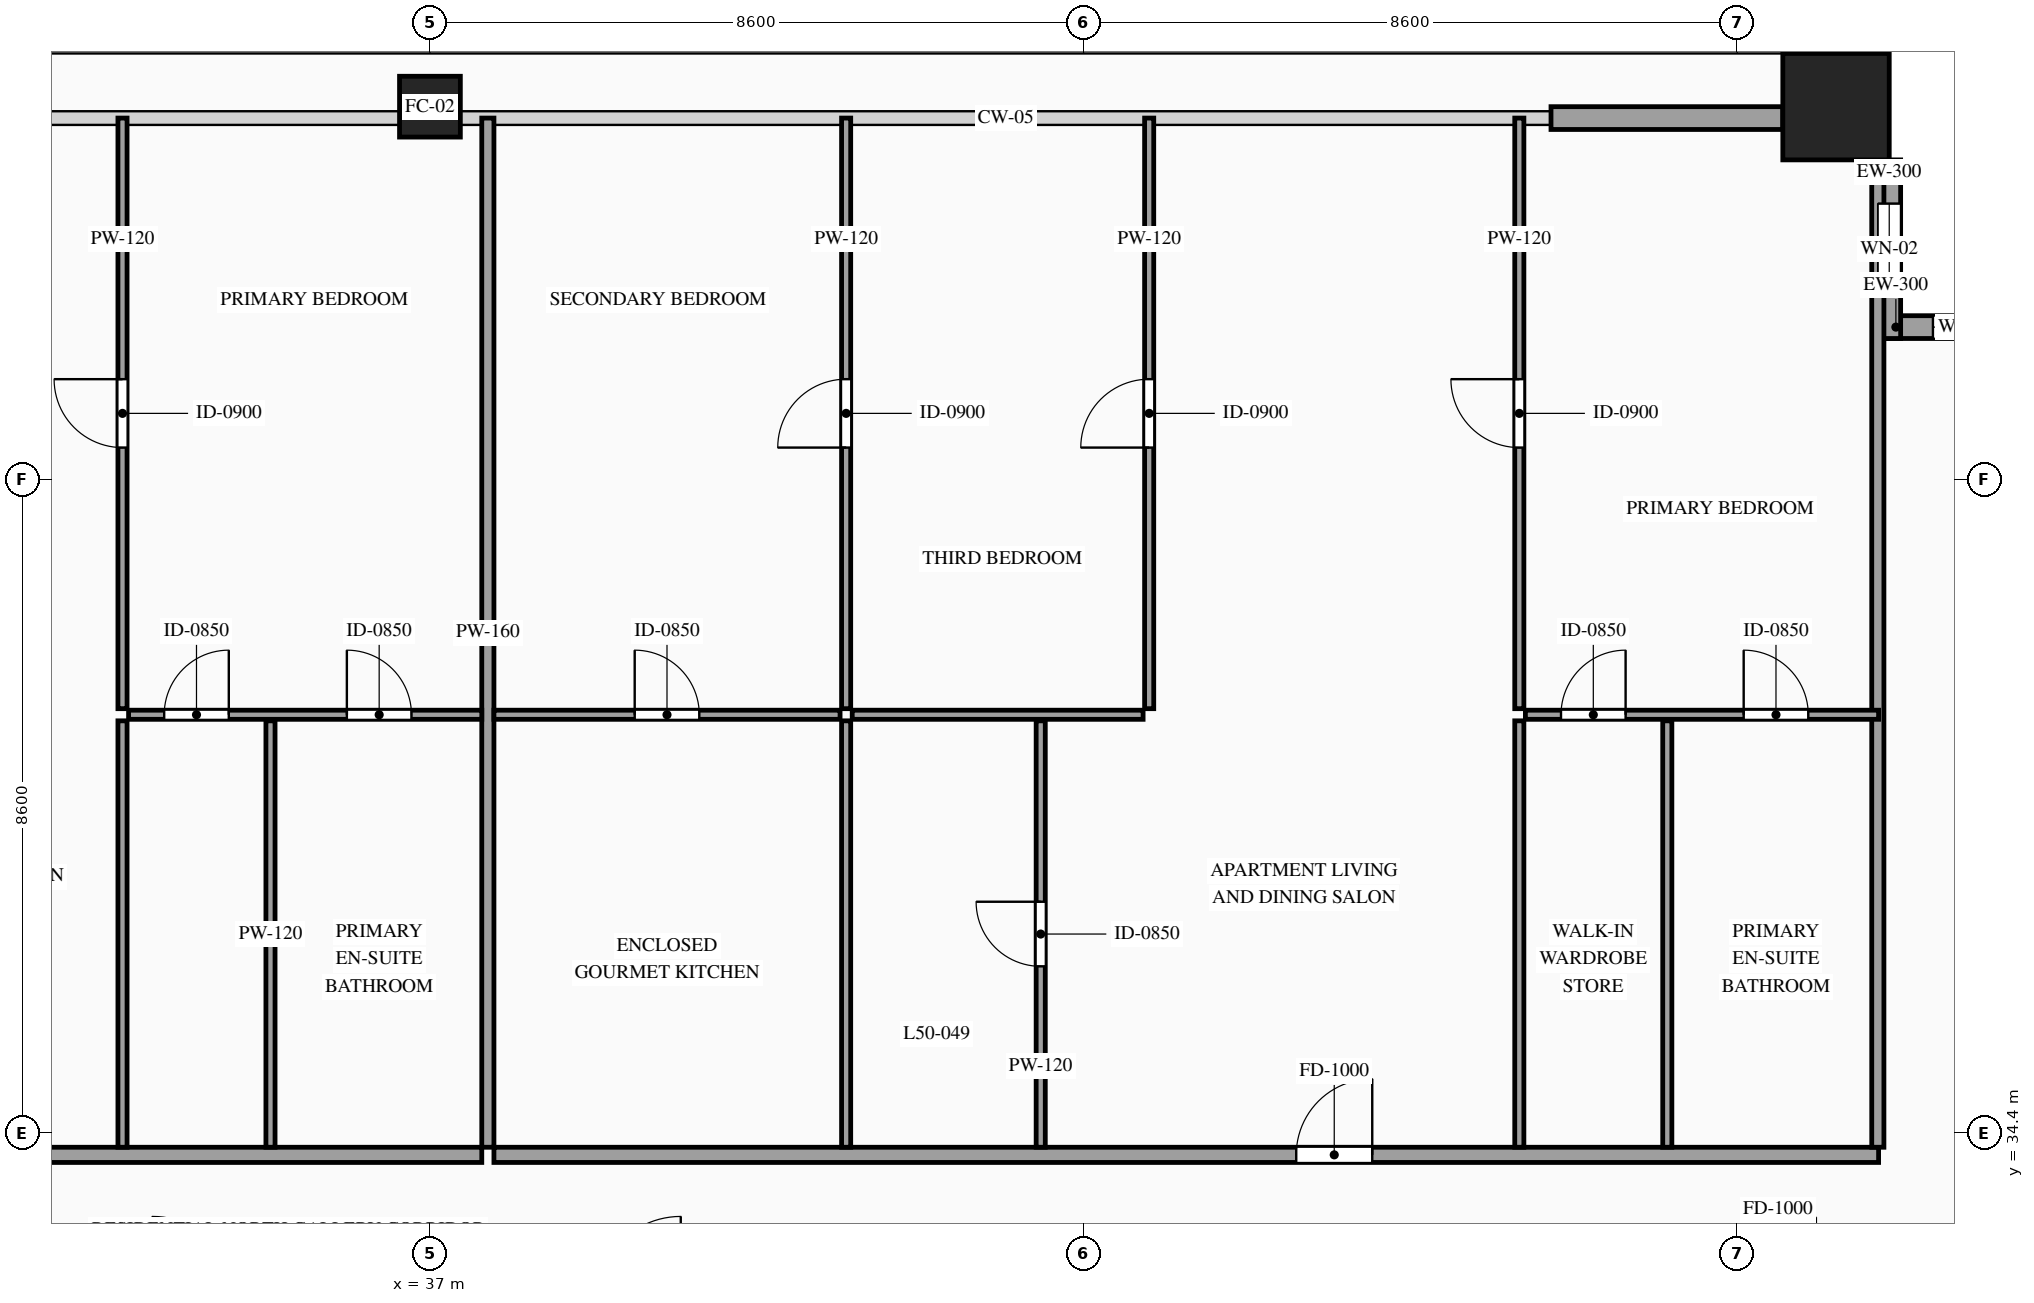
"""IFC4 building model, lengths in metres.
Left out: names, types, materials, properties, quantities, classifications, styles, units other than length and angle.
Written with IfcOpenShell. Run it as: python <this file> out.ifc"""

import sys

from ifc_helpers import new_model, si_unit, direction, frame, frame_2d, origin, origin_2d, place, context, subcontext, project, spatial, rectangle, hollow_rectangle, extrude, source, transform, mapped, element, fill, save


model = new_model("IFC4")
c1 = context("Model", 3, precision=1e-05, world=origin(), true_north=direction((0.0, 1.0)))
c2 = subcontext(c1, "Body", "Model", "MODEL_VIEW")
j1 = project(units=[si_unit("LENGTHUNIT", "METRE"), si_unit("PLANEANGLEUNIT", "RADIAN")], contexts=[c1])
p1 = place(None, origin())
s1 = spatial("IfcSite", under=j1, at=p1, CompositionType="ELEMENT")
p2 = place(p1, origin())
s2 = spatial("IfcBuilding", under=s1, at=p2, CompositionType="ELEMENT")
p3 = place(p2, frame((0.0, 0.0, 191.5)))
s3 = spatial("IfcBuildingStorey", under=s2, at=p3, CompositionType="ELEMENT", Elevation=191.5)
m1 = source(origin(), c2, "Body", "SweptSolid", [
    extrude(hollow_rectangle(XDim=0.8, YDim=0.8, WallThickness=0.036, at=origin_2d()), origin(), (0.0, 0.0, 1.0), 3.5),
])
p4 = place(p3, frame((37.0, 47.9, 0.0), z_axis=(0.0, 0.0, 1.0), x_axis=(1.0, 0.0, 0.0)))
e1 = element("IfcColumn", 1, at=p4, inside=s3, PredefinedType="COLUMN", context=c2, shape_type="MappedRepresentation", body=[
    mapped(m1, transform((0.0, 0.0, 0.0), scale=1.0)),
])
m2 = source(origin(), c2, "Body", "SweptSolid", [
    extrude(hollow_rectangle(XDim=1.4, YDim=1.4, WallThickness=0.06, at=origin_2d()), origin(), (0.0, 0.0, 1.0), 3.5),
])
p5 = place(p3, frame((55.5, 47.9, 0.0), z_axis=(0.0, 0.0, 1.0), x_axis=(1.0, 0.0, 0.0)))
e2 = element("IfcColumn", 2, at=p5, inside=s3, PredefinedType="COLUMN", context=c2, shape_type="MappedRepresentation", body=[
    mapped(m2, transform((0.0, 0.0, 0.0), scale=1.0)),
])
p6 = place(p3, frame((58.4, 45.0, 0.0), z_axis=(0.0, 0.0, 1.0), x_axis=(-1.0, 0.0, 0.0)))
e3 = element("IfcWall", 3, at=p6, inside=s3, PredefinedType="SOLIDWALL", context=c2, shape_type="SweptSolid", body=[
    extrude(rectangle(XDim=2.35, YDim=0.3, at=frame_2d((1.175, 0.0))), origin(), (0.0, 0.0, 1.0), 3.28),
])
p7 = place(p6, frame((0.725, 0.0, 0.85)))
e4 = element("IfcOpeningElement", 4, at=p7, cuts=e3, PredefinedType="OPENING", context=c2, shape_type="SweptSolid", body=[
    extrude(rectangle(XDim=0.9, YDim=1.5, at=frame_2d((0.45, 0.75))), frame((0.0, 0.165, 0.0), z_axis=(0.0, -1.0, 0.0), x_axis=(1.0, 0.0, 0.0)), (0.0, 0.0, 1.0), 0.33),
])
p8 = place(p3, frame((56.2, 44.85, 0.0), z_axis=(0.0, 0.0, 1.0), x_axis=(0.0, 1.0, 0.0)))
e5 = element("IfcWall", 5, at=p8, inside=s3, PredefinedType="SOLIDWALL", context=c2, shape_type="SweptSolid", body=[
    extrude(rectangle(XDim=2.35, YDim=0.3, at=frame_2d((1.175, 0.0))), origin(), (0.0, 0.0, 1.0), 3.28),
])
p9 = place(p8, frame((0.575, 0.0, 0.85)))
e6 = element("IfcOpeningElement", 6, at=p9, cuts=e5, PredefinedType="OPENING", context=c2, shape_type="SweptSolid", body=[
    extrude(rectangle(XDim=1.2, YDim=2.1, at=frame_2d((0.6, 1.05))), frame((0.0, 0.165, 0.0), z_axis=(0.0, -1.0, 0.0), x_axis=(1.0, 0.0, 0.0)), (0.0, 0.0, 1.0), 0.33),
])
m3 = source(origin(), c2, "Body", "SweptSolid", [
    extrude(rectangle(XDim=3.05, YDim=0.3, at=frame_2d((1.525, 0.0))), origin(), (0.0, 0.0, 1.0), 2.835),
])
p10 = place(p3, frame((51.75, 47.75, 0.0), z_axis=(0.0, 0.0, 1.0), x_axis=(1.0, 0.0, 0.0)))
e7 = element("IfcWall", 7, at=p10, inside=s3, PredefinedType="SOLIDWALL", context=c2, shape_type="MappedRepresentation", body=[
    mapped(m3, transform((0.0, 0.0, 0.0), scale=1.0)),
])
p11 = place(p3, frame((17.94, 34.11, 0.0), z_axis=(0.0, 0.0, 1.0), x_axis=(1.0, 0.0, 0.0)))
e8 = element("IfcWall", 8, at=p11, inside=s3, PredefinedType="PARTITIONING", context=c2, shape_type="SweptSolid", body=[
    extrude(rectangle(XDim=19.742, YDim=0.2, at=frame_2d((9.871, 0.0))), origin(), (0.0, 0.0, 1.0), 3.28),
])
p12 = place(p11, frame((11.915, 0.0, 0.0)))
e9 = element("IfcOpeningElement", 9, at=p12, cuts=e8, PredefinedType="OPENING", context=c2, shape_type="SweptSolid", body=[
    extrude(rectangle(XDim=1.0, YDim=2.2, at=frame_2d((0.5, 1.1))), frame((0.0, 0.115, 0.0), z_axis=(0.0, -1.0, 0.0), x_axis=(1.0, 0.0, 0.0)), (0.0, 0.0, 1.0), 0.23),
])
m4 = source(origin(), c2, "Body", "SweptSolid", [
    extrude(rectangle(XDim=13.54, YDim=0.16, at=frame_2d((6.77, 0.0))), origin(), (0.0, 0.0, 1.0), 3.28),
])
p13 = place(p3, frame((37.762, 34.21, 0.0), z_axis=(0.0, 0.0, 1.0), x_axis=(0.0, 1.0, 0.0)))
e10 = element("IfcWall", 10, at=p13, inside=s3, PredefinedType="PARTITIONING", context=c2, shape_type="MappedRepresentation", body=[
    mapped(m4, transform((0.0, 0.0, 0.0), scale=1.0)),
])
m5 = source(origin(), c2, "Body", "SweptSolid", [
    extrude(rectangle(XDim=5.61, YDim=0.12, at=frame_2d((2.805, 0.0))), origin(), (0.0, 0.0, 1.0), 3.28),
])
for number, where, z_axis, x_axis in (
    (11, (34.902, 34.21, 0.0), (0.0, 0.0, 1.0), (0.0, 1.0, 0.0)),
    (12, (32.955, 34.21, 0.0), (0.0, 0.0, 1.0), (0.0, 1.0, 0.0)),
):
    element("IfcWall", number, at=place(p3, frame(where, z_axis=z_axis, x_axis=x_axis)), inside=s3, PredefinedType="PARTITIONING", context=c2, shape_type="MappedRepresentation", body=[
        mapped(m5, transform((0.0, 0.0, 0.0), scale=1.0)),
    ])
p14 = place(p3, frame((33.035, 39.9, 0.0), z_axis=(0.0, 0.0, 1.0), x_axis=(1.0, 0.0, 0.0)))
e13 = element("IfcWall", 13, at=p14, inside=s3, PredefinedType="PARTITIONING", context=c2, shape_type="SweptSolid", body=[
    extrude(rectangle(XDim=4.647, YDim=0.12, at=frame_2d((2.323, 0.0))), origin(), (0.0, 0.0, 1.0), 2.875),
])
p15 = place(p14, frame((2.872, 0.0, 0.0)))
e14 = element("IfcOpeningElement", 14, at=p15, cuts=e13, PredefinedType="OPENING", context=c2, shape_type="SweptSolid", body=[
    extrude(rectangle(XDim=0.85, YDim=2.1, at=frame_2d((0.425, 1.05))), frame((0.0, 0.075, 0.0), z_axis=(0.0, -1.0, 0.0), x_axis=(1.0, 0.0, 0.0)), (0.0, 0.0, 1.0), 0.15),
])
p16 = place(p14, frame((0.469, 0.0, 0.0)))
e15 = element("IfcOpeningElement", 15, at=p16, cuts=e13, PredefinedType="OPENING", context=c2, shape_type="SweptSolid", body=[
    extrude(rectangle(XDim=0.85, YDim=2.1, at=frame_2d((0.425, 1.05))), frame((0.0, 0.075, 0.0), z_axis=(0.0, -1.0, 0.0), x_axis=(1.0, 0.0, 0.0)), (0.0, 0.0, 1.0), 0.15),
])
p17 = place(p3, frame((32.955, 39.98, 0.0), z_axis=(0.0, 0.0, 1.0), x_axis=(0.0, 1.0, 0.0)))
e16 = element("IfcWall", 16, at=p17, inside=s3, PredefinedType="PARTITIONING", context=c2, shape_type="SweptSolid", body=[
    extrude(rectangle(XDim=7.77, YDim=0.12, at=frame_2d((3.885, 0.0))), origin(), (0.0, 0.0, 1.0), 3.28),
])
p18 = place(p17, frame((3.435, 0.0, 0.0)))
e17 = element("IfcOpeningElement", 17, at=p18, cuts=e16, PredefinedType="OPENING", context=c2, shape_type="SweptSolid", body=[
    extrude(rectangle(XDim=0.9, YDim=2.15, at=frame_2d((0.45, 1.075))), frame((0.0, 0.075, 0.0), z_axis=(0.0, -1.0, 0.0), x_axis=(1.0, 0.0, 0.0)), (0.0, 0.0, 1.0), 0.15),
])
p19 = place(p3, frame((37.842, 34.11, 0.0), z_axis=(0.0, 0.0, 1.0), x_axis=(1.0, 0.0, 0.0)))
e18 = element("IfcWall", 18, at=p19, inside=s3, PredefinedType="PARTITIONING", context=c2, shape_type="SweptSolid", body=[
    extrude(rectangle(XDim=18.218, YDim=0.2, at=frame_2d((9.109, 0.0))), origin(), (0.0, 0.0, 1.0), 3.28),
])
p20 = place(p19, frame((10.556, 0.0, 0.0)))
e19 = element("IfcOpeningElement", 19, at=p20, cuts=e18, PredefinedType="OPENING", context=c2, shape_type="SweptSolid", body=[
    extrude(rectangle(XDim=1.0, YDim=2.2, at=frame_2d((0.5, 1.1))), frame((0.0, 0.115, 0.0), z_axis=(0.0, -1.0, 0.0), x_axis=(1.0, 0.0, 0.0)), (0.0, 0.0, 1.0), 0.23),
])
m6 = source(origin(), c2, "Body", "SweptSolid", [
    extrude(rectangle(XDim=13.39, YDim=0.16, at=frame_2d((6.695, 0.0))), origin(), (0.0, 0.0, 1.0), 3.28),
])
p21 = place(p3, frame((56.05, 34.21, 0.0), z_axis=(0.0, 0.0, 1.0), x_axis=(0.0, 1.0, 0.0)))
e20 = element("IfcWall", 20, at=p21, inside=s3, PredefinedType="PARTITIONING", context=c2, shape_type="MappedRepresentation", body=[
    mapped(m6, transform((0.0, 0.0, 0.0), scale=1.0)),
])
p22 = place(p3, frame((37.842, 39.9, 0.0), z_axis=(0.0, 0.0, 1.0), x_axis=(1.0, 0.0, 0.0)))
e21 = element("IfcWall", 21, at=p22, inside=s3, PredefinedType="PARTITIONING", context=c2, shape_type="SweptSolid", body=[
    extrude(rectangle(XDim=4.554, YDim=0.12, at=frame_2d((2.277, 0.0))), origin(), (0.0, 0.0, 1.0), 2.875),
])
p23 = place(p22, frame((1.852, 0.0, 0.0)))
e22 = element("IfcOpeningElement", 22, at=p23, cuts=e21, PredefinedType="OPENING", context=c2, shape_type="SweptSolid", body=[
    extrude(rectangle(XDim=0.85, YDim=2.1, at=frame_2d((0.425, 1.05))), frame((0.0, 0.075, 0.0), z_axis=(0.0, -1.0, 0.0), x_axis=(1.0, 0.0, 0.0)), (0.0, 0.0, 1.0), 0.15),
])
p24 = place(p3, frame((42.476, 34.21, 0.0), z_axis=(0.0, 0.0, 1.0), x_axis=(0.0, 1.0, 0.0)))
e23 = element("IfcWall", 23, at=p24, inside=s3, PredefinedType="PARTITIONING", context=c2, shape_type="MappedRepresentation", body=[
    mapped(m5, transform((0.0, 0.0, 0.0), scale=1.0)),
])
p25 = place(p3, frame((45.036, 34.21, 0.0), z_axis=(0.0, 0.0, 1.0), x_axis=(0.0, 1.0, 0.0)))
e24 = element("IfcWall", 24, at=p25, inside=s3, PredefinedType="PARTITIONING", context=c2, shape_type="SweptSolid", body=[
    extrude(rectangle(XDim=5.61, YDim=0.12, at=frame_2d((2.805, 0.0))), origin(), (0.0, 0.0, 1.0), 3.28),
])
p26 = place(p25, frame((2.38, 0.0, 0.0)))
e25 = element("IfcOpeningElement", 25, at=p26, cuts=e24, PredefinedType="OPENING", context=c2, shape_type="SweptSolid", body=[
    extrude(rectangle(XDim=0.85, YDim=2.1, at=frame_2d((0.425, 1.05))), frame((0.0, 0.075, 0.0), z_axis=(0.0, -1.0, 0.0), x_axis=(1.0, 0.0, 0.0)), (0.0, 0.0, 1.0), 0.15),
])
for number, where, z_axis, x_axis in (
    (26, (53.28, 34.21, 0.0), (0.0, 0.0, 1.0), (0.0, 1.0, 0.0)),
    (27, (51.333, 34.21, 0.0), (0.0, 0.0, 1.0), (0.0, 1.0, 0.0)),
):
    element("IfcWall", number, at=place(p3, frame(where, z_axis=z_axis, x_axis=x_axis)), inside=s3, PredefinedType="PARTITIONING", context=c2, shape_type="MappedRepresentation", body=[
        mapped(m5, transform((0.0, 0.0, 0.0), scale=1.0)),
    ])
p27 = place(p3, frame((42.476, 39.98, 0.0), z_axis=(0.0, 0.0, 1.0), x_axis=(0.0, 1.0, 0.0)))
e28 = element("IfcWall", 28, at=p27, inside=s3, PredefinedType="PARTITIONING", context=c2, shape_type="SweptSolid", body=[
    extrude(rectangle(XDim=7.77, YDim=0.12, at=frame_2d((3.885, 0.0))), origin(), (0.0, 0.0, 1.0), 3.28),
])
p28 = place(p27, frame((3.435, 0.0, 0.0)))
e29 = element("IfcOpeningElement", 29, at=p28, cuts=e28, PredefinedType="OPENING", context=c2, shape_type="SweptSolid", body=[
    extrude(rectangle(XDim=0.9, YDim=2.15, at=frame_2d((0.45, 1.075))), frame((0.0, 0.075, 0.0), z_axis=(0.0, -1.0, 0.0), x_axis=(1.0, 0.0, 0.0)), (0.0, 0.0, 1.0), 0.15),
])
p29 = place(p3, frame((51.413, 39.9, 0.0), z_axis=(0.0, 0.0, 1.0), x_axis=(1.0, 0.0, 0.0)))
e30 = element("IfcWall", 30, at=p29, inside=s3, PredefinedType="PARTITIONING", context=c2, shape_type="SweptSolid", body=[
    extrude(rectangle(XDim=4.647, YDim=0.12, at=frame_2d((2.323, 0.0))), origin(), (0.0, 0.0, 1.0), 3.28),
])
p30 = place(p29, frame((2.872, 0.0, 0.0)))
e31 = element("IfcOpeningElement", 31, at=p30, cuts=e30, PredefinedType="OPENING", context=c2, shape_type="SweptSolid", body=[
    extrude(rectangle(XDim=0.85, YDim=2.1, at=frame_2d((0.425, 1.05))), frame((0.0, 0.075, 0.0), z_axis=(0.0, -1.0, 0.0), x_axis=(1.0, 0.0, 0.0)), (0.0, 0.0, 1.0), 0.15),
])
p31 = place(p29, frame((0.469, 0.0, 0.0)))
e32 = element("IfcOpeningElement", 32, at=p31, cuts=e30, PredefinedType="OPENING", context=c2, shape_type="SweptSolid", body=[
    extrude(rectangle(XDim=0.85, YDim=2.1, at=frame_2d((0.425, 1.05))), frame((0.0, 0.075, 0.0), z_axis=(0.0, -1.0, 0.0), x_axis=(1.0, 0.0, 0.0)), (0.0, 0.0, 1.0), 0.15),
])
p32 = place(p3, frame((51.333, 39.98, 0.0), z_axis=(0.0, 0.0, 1.0), x_axis=(0.0, 1.0, 0.0)))
e33 = element("IfcWall", 33, at=p32, inside=s3, PredefinedType="PARTITIONING", context=c2, shape_type="SweptSolid", body=[
    extrude(rectangle(XDim=7.77, YDim=0.12, at=frame_2d((3.885, 0.0))), origin(), (0.0, 0.0, 1.0), 3.28),
])
p33 = place(p32, frame((3.435, 0.0, 0.0)))
e34 = element("IfcOpeningElement", 34, at=p33, cuts=e33, PredefinedType="OPENING", context=c2, shape_type="SweptSolid", body=[
    extrude(rectangle(XDim=0.9, YDim=2.15, at=frame_2d((0.45, 1.075))), frame((0.0, 0.075, 0.0), z_axis=(0.0, -1.0, 0.0), x_axis=(1.0, 0.0, 0.0)), (0.0, 0.0, 1.0), 0.15),
])
m7 = source(origin(), c2, "Body", "SweptSolid", [
    extrude(rectangle(XDim=3.827, YDim=0.12, at=frame_2d((1.914, 0.0))), origin(), (0.0, 0.0, 1.0), 2.875),
])
p34 = place(p3, frame((42.556, 39.9, 0.0), z_axis=(0.0, 0.0, 1.0), x_axis=(1.0, 0.0, 0.0)))
e35 = element("IfcWall", 35, at=p34, inside=s3, PredefinedType="PARTITIONING", context=c2, shape_type="MappedRepresentation", body=[
    mapped(m7, transform((0.0, 0.0, 0.0), scale=1.0)),
])
p35 = place(p3, frame((46.463, 39.98, 0.0), z_axis=(0.0, 0.0, 1.0), x_axis=(0.0, 1.0, 0.0)))
e36 = element("IfcWall", 36, at=p35, inside=s3, PredefinedType="PARTITIONING", context=c2, shape_type="SweptSolid", body=[
    extrude(rectangle(XDim=7.77, YDim=0.12, at=frame_2d((3.885, 0.0))), origin(), (0.0, 0.0, 1.0), 3.28),
])
p36 = place(p35, frame((3.435, 0.0, 0.0)))
e37 = element("IfcOpeningElement", 37, at=p36, cuts=e36, PredefinedType="OPENING", context=c2, shape_type="SweptSolid", body=[
    extrude(rectangle(XDim=0.9, YDim=2.15, at=frame_2d((0.45, 1.075))), frame((0.0, 0.075, 0.0), z_axis=(0.0, -1.0, 0.0), x_axis=(1.0, 0.0, 0.0)), (0.0, 0.0, 1.0), 0.15),
])
m8 = source(origin(), c2, "Body", "SweptSolid", [
    extrude(rectangle(XDim=0.9, YDim=1.5, at=frame_2d((0.45, 0.75))), frame((0.0, 0.03, 0.0), z_axis=(0.0, -1.0, 0.0), x_axis=(1.0, 0.0, 0.0)), (0.0, 0.0, 1.0), 0.06),
])
p37 = place(p7, origin())
e38 = element("IfcWindow", 38, at=p37, inside=s3, PartitioningType="SINGLE_PANEL", PredefinedType="WINDOW", context=c2, shape_type="MappedRepresentation", body=[
    mapped(m8, transform((0.0, 0.0, 0.0), scale=1.0)),
])
fill(e4, e38)
m9 = source(origin(), c2, "Body", "SweptSolid", [
    extrude(rectangle(XDim=1.2, YDim=2.1, at=frame_2d((0.6, 1.05))), frame((0.0, 0.03, 0.0), z_axis=(0.0, -1.0, 0.0), x_axis=(1.0, 0.0, 0.0)), (0.0, 0.0, 1.0), 0.06),
])
p38 = place(p9, origin())
e39 = element("IfcWindow", 39, at=p38, inside=s3, PartitioningType="SINGLE_PANEL", PredefinedType="WINDOW", context=c2, shape_type="MappedRepresentation", body=[
    mapped(m9, transform((0.0, 0.0, 0.0), scale=1.0)),
])
fill(e6, e39)
m10 = source(origin(), c2, "Body", "SweptSolid", [
    extrude(rectangle(XDim=0.85, YDim=2.1, at=frame_2d((0.425, 1.05))), frame((0.0, 0.025, 0.0), z_axis=(0.0, -1.0, 0.0), x_axis=(1.0, 0.0, 0.0)), (0.0, 0.0, 1.0), 0.05),
])
p39 = place(p15, origin())
e40 = element("IfcDoor", 40, at=p39, inside=s3, OperationType="SINGLE_SWING_LEFT", PredefinedType="DOOR", context=c2, shape_type="MappedRepresentation", body=[
    mapped(m10, transform((0.0, 0.0, 0.0), scale=1.0)),
])
fill(e14, e40)
p40 = place(p16, origin())
e41 = element("IfcDoor", 41, at=p40, inside=s3, OperationType="SINGLE_SWING_RIGHT", PredefinedType="DOOR", context=c2, shape_type="MappedRepresentation", body=[
    mapped(m10, transform((0.0, 0.0, 0.0), scale=1.0)),
])
fill(e15, e41)
m11 = source(origin(), c2, "Body", "SweptSolid", [
    extrude(rectangle(XDim=0.9, YDim=2.15, at=frame_2d((0.45, 1.075))), frame((0.0, 0.025, 0.0), z_axis=(0.0, -1.0, 0.0), x_axis=(1.0, 0.0, 0.0)), (0.0, 0.0, 1.0), 0.05),
])
p41 = place(p18, origin())
e42 = element("IfcDoor", 42, at=p41, inside=s3, OperationType="SINGLE_SWING_RIGHT", PredefinedType="DOOR", context=c2, shape_type="MappedRepresentation", body=[
    mapped(m11, transform((0.0, 0.0, 0.0), scale=1.0)),
])
fill(e17, e42)
m12 = source(origin(), c2, "Body", "SweptSolid", [
    extrude(rectangle(XDim=1.0, YDim=2.2, at=frame_2d((0.5, 1.1))), frame((0.0, 0.025, 0.0), z_axis=(0.0, -1.0, 0.0), x_axis=(1.0, 0.0, 0.0)), (0.0, 0.0, 1.0), 0.05),
])
p42 = place(p20, origin())
e43 = element("IfcDoor", 43, at=p42, inside=s3, OperationType="SINGLE_SWING_RIGHT", PredefinedType="DOOR", context=c2, shape_type="MappedRepresentation", body=[
    mapped(m12, transform((0.0, 0.0, 0.0), scale=1.0)),
])
fill(e19, e43)
p43 = place(p23, origin())
e44 = element("IfcDoor", 44, at=p43, inside=s3, OperationType="SINGLE_SWING_LEFT", PredefinedType="DOOR", context=c2, shape_type="MappedRepresentation", body=[
    mapped(m10, transform((0.0, 0.0, 0.0), scale=1.0)),
])
fill(e22, e44)
p44 = place(p26, origin())
e45 = element("IfcDoor", 45, at=p44, inside=s3, OperationType="SINGLE_SWING_RIGHT", PredefinedType="DOOR", context=c2, shape_type="MappedRepresentation", body=[
    mapped(m10, transform((0.0, 0.0, 0.0), scale=1.0)),
])
fill(e25, e45)
p45 = place(p30, origin())
e46 = element("IfcDoor", 46, at=p45, inside=s3, OperationType="SINGLE_SWING_LEFT", PredefinedType="DOOR", context=c2, shape_type="MappedRepresentation", body=[
    mapped(m10, transform((0.0, 0.0, 0.0), scale=1.0)),
])
fill(e31, e46)
p46 = place(p31, origin())
e47 = element("IfcDoor", 47, at=p46, inside=s3, OperationType="SINGLE_SWING_RIGHT", PredefinedType="DOOR", context=c2, shape_type="MappedRepresentation", body=[
    mapped(m10, transform((0.0, 0.0, 0.0), scale=1.0)),
])
fill(e32, e47)
p47 = place(p28, origin())
e48 = element("IfcDoor", 48, at=p47, inside=s3, OperationType="SINGLE_SWING_LEFT", PredefinedType="DOOR", context=c2, shape_type="MappedRepresentation", body=[
    mapped(m11, transform((0.0, 0.0, 0.0), scale=1.0)),
])
fill(e29, e48)
p48 = place(p33, origin())
e49 = element("IfcDoor", 49, at=p48, inside=s3, OperationType="SINGLE_SWING_RIGHT", PredefinedType="DOOR", context=c2, shape_type="MappedRepresentation", body=[
    mapped(m11, transform((0.0, 0.0, 0.0), scale=1.0)),
])
fill(e34, e49)
p49 = place(p36, origin())
e50 = element("IfcDoor", 50, at=p49, inside=s3, OperationType="SINGLE_SWING_LEFT", PredefinedType="DOOR", context=c2, shape_type="MappedRepresentation", body=[
    mapped(m11, transform((0.0, 0.0, 0.0), scale=1.0)),
])
fill(e37, e50)
save(model, sys.argv[1])
